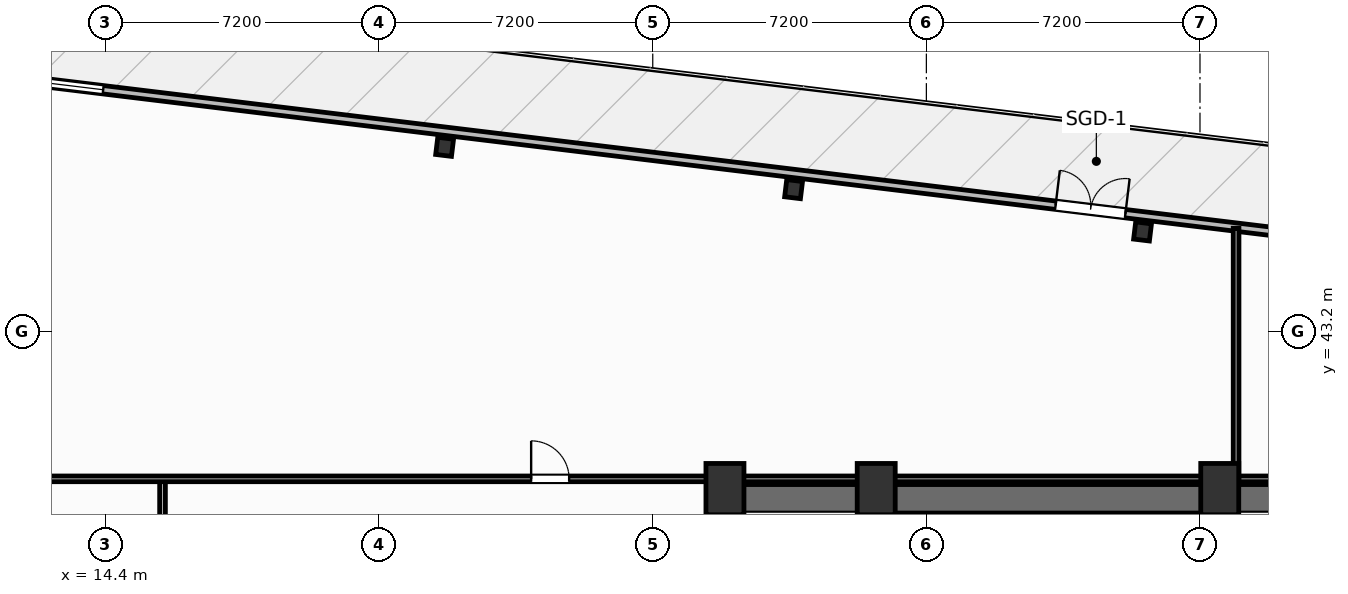
"""IFC4 building model, lengths in metres.
Left out: names, types, materials, properties, quantities, classifications, styles, units other than length and angle.
Written with IfcOpenShell. Run it as: python <this file> out.ifc"""

import sys

from ifc_helpers import new_model, si_unit, direction, frame, frame_2d, origin, origin_2d, place, context, subcontext, project, spatial, rectangle, i_section, extrude, element, fill, save


model = new_model("IFC4")
c1 = context("Model", 3, precision=1e-05, world=origin(), true_north=direction((0.0, 1.0)))
c2 = subcontext(c1, "Body", "Model", "MODEL_VIEW")
j1 = project(units=[si_unit("LENGTHUNIT", "METRE"), si_unit("PLANEANGLEUNIT", "RADIAN")], contexts=[c1])
p1 = place(None, origin())
s1 = spatial("IfcSite", under=j1, at=p1, CompositionType="ELEMENT")
p2 = place(p1, origin())
s2 = spatial("IfcBuilding", under=s1, at=p2, CompositionType="ELEMENT")
p3 = place(p2, frame((0.0, 0.0, 116.9)))
s3 = spatial("IfcBuildingStorey", under=s2, at=p3, CompositionType="ELEMENT", Elevation=116.9)
for number, where, z_axis, x_axis in (
    (1, (30.7, 39.05, 0.0), (0.0, 0.0, 1.0), (1.0, 0.0, 0.0)),
    (2, (34.68, 39.05, 0.0), (0.0, 0.0, 1.0), (1.0, 0.0, 0.0)),
    (3, (43.72, 39.05, 0.0), (0.0, 0.0, 1.0), (1.0, 0.0, 0.0)),
):
    element("IfcColumn", number, at=place(p3, frame(where, z_axis=z_axis, x_axis=x_axis)), inside=s3, PredefinedType="COLUMN", context=c2, shape_type="SweptSolid", body=[
        extrude(rectangle(XDim=1.0, YDim=1.35, at=origin_2d()), origin(), (0.0, 0.0, 1.0), 4.8),
    ])
p4 = place(p3, frame((30.38, 38.795, 0.0), z_axis=(0.0, 0.0, 1.0), x_axis=(1.0, 0.0, 0.0)))
e4 = element("IfcWall", 4, at=p4, inside=s3, PredefinedType="SHEAR", context=c2, shape_type="SweptSolid", body=[
    extrude(rectangle(XDim=17.64, YDim=0.75, at=frame_2d((8.82, 0.0))), origin(), (0.0, 0.0, 1.0), 4.55),
])
p5 = place(p3, frame((30.755, 29.2, 0.0), z_axis=(0.0, 0.0, 1.0), x_axis=(0.0, 1.0, 0.0)))
e5 = element("IfcWall", 5, at=p5, inside=s3, PredefinedType="SHEAR", context=c2, shape_type="SweptSolid", body=[
    extrude(rectangle(XDim=9.22, YDim=0.75, at=frame_2d((4.61, 0.0))), origin(), (0.0, 0.0, 1.0), 4.55),
])
p6 = place(p3, frame((34.64, 29.2, 0.0), z_axis=(0.0, 0.0, 1.0), x_axis=(0.0, 1.0, 0.0)))
e6 = element("IfcWall", 6, at=p6, inside=s3, PredefinedType="SHEAR", context=c2, shape_type="SweptSolid", body=[
    extrude(rectangle(XDim=9.22, YDim=0.25, at=frame_2d((4.61, 0.0))), origin(), (0.0, 0.0, 1.0), 4.55),
])
p7 = place(p6, frame((0.65, 0.0, 0.0)))
e7 = element("IfcOpeningElement", 7, at=p7, cuts=e6, PredefinedType="OPENING", context=c2, shape_type="SweptSolid", body=[
    extrude(rectangle(XDim=1.05, YDim=2.15, at=frame_2d((0.525, 1.075))), frame((0.0, 0.135, 0.0), z_axis=(0.0, -1.0, 0.0), x_axis=(1.0, 0.0, 0.0)), (0.0, 0.0, 1.0), 0.27),
])
p8 = place(p3, frame((43.76, 29.2, 0.0), z_axis=(0.0, 0.0, 1.0), x_axis=(0.0, 1.0, 0.0)))
e8 = element("IfcWall", 8, at=p8, inside=s3, PredefinedType="SHEAR", context=c2, shape_type="SweptSolid", body=[
    extrude(rectangle(XDim=9.22, YDim=0.25, at=frame_2d((4.61, 0.0))), origin(), (0.0, 0.0, 1.0), 4.55),
])
p9 = place(p8, frame((0.65, 0.0, 0.0)))
e9 = element("IfcOpeningElement", 9, at=p9, cuts=e8, PredefinedType="OPENING", context=c2, shape_type="SweptSolid", body=[
    extrude(rectangle(XDim=1.05, YDim=2.15, at=frame_2d((0.525, 1.075))), frame((0.0, 0.135, 0.0), z_axis=(0.0, -1.0, 0.0), x_axis=(1.0, 0.0, 0.0)), (0.0, 0.0, 1.0), 0.27),
])
for number, where, z_axis, x_axis in (
    (10, (41.689, 45.83, -0.32), (0.0, 0.0, 1.0), (0.993, -0.12, 0.0)),
    (11, (32.506, 46.943, -0.32), (0.0, 0.0, 1.0), (0.993, -0.12, 0.0)),
    (12, (23.323, 48.056, -0.32), (0.0, 0.0, 1.0), (0.993, -0.12, 0.0)),
):
    element("IfcColumn", number, at=place(p3, frame(where, z_axis=z_axis, x_axis=x_axis)), inside=s3, PredefinedType="COLUMN", context=c2, shape_type="SweptSolid", body=[
        extrude(i_section(OverallWidth=0.418, OverallDepth=0.455, WebThickness=0.042, FlangeThickness=0.068, FilletRadius=0.025, at=origin_2d()), origin(), (0.0, 0.0, 1.0), 5.12),
    ])
p10 = place(p3, frame((12.155, 49.823, 0.0), z_axis=(0.0, 0.0, 1.0), x_axis=(0.992732017356, -0.120345925214, 0.0)))
e13 = element("IfcWall", 13, at=p10, inside=s3, PredefinedType="SOLIDWALL", context=c2, shape_type="SweptSolid", body=[
    extrude(rectangle(XDim=59.6, YDim=0.22, at=frame_2d((29.8, 0.0))), origin(), (0.0, 0.0, 1.0), 3.83),
])
p11 = place(p10, frame((27.446, 0.0, 0.0)))
e14 = element("IfcOpeningElement", 14, at=p11, cuts=e13, PredefinedType="OPENING", context=c2, shape_type="SweptSolid", body=[
    extrude(rectangle(XDim=1.85, YDim=2.3, at=frame_2d((0.925, 1.15))), frame((0.0, 0.12, 0.0), z_axis=(0.0, -1.0, 0.0), x_axis=(1.0, 0.0, 0.0)), (0.0, 0.0, 1.0), 0.24),
])
p12 = place(p10, frame((0.55, 0.0, 0.75)))
e15 = element("IfcOpeningElement", 15, at=p12, cuts=e13, PredefinedType="OPENING", context=c2, shape_type="SweptSolid", body=[
    extrude(rectangle(XDim=1.65, YDim=1.65, at=frame_2d((0.825, 0.825))), frame((0.0, 0.12, 0.0), z_axis=(0.0, -1.0, 0.0), x_axis=(1.0, 0.0, 0.0)), (0.0, 0.0, 1.0), 0.24),
])
p13 = place(p10, frame((57.4, 0.0, 0.75)))
e16 = element("IfcOpeningElement", 16, at=p13, cuts=e13, PredefinedType="OPENING", context=c2, shape_type="SweptSolid", body=[
    extrude(rectangle(XDim=1.65, YDim=1.65, at=frame_2d((0.825, 0.825))), frame((0.0, 0.12, 0.0), z_axis=(0.0, -1.0, 0.0), x_axis=(1.0, 0.0, 0.0)), (0.0, 0.0, 1.0), 0.24),
])
p14 = place(p3, frame((15.9, 6.91, 0.0), z_axis=(0.0, 0.0, 1.0), x_axis=(0.0, 1.0, 0.0)))
e17 = element("IfcWall", 17, at=p14, inside=s3, PredefinedType="PARTITIONING", context=c2, shape_type="SweptSolid", body=[
    extrude(rectangle(XDim=32.41, YDim=0.15, at=frame_2d((16.205, 0.0))), origin(), (0.0, 0.0, 1.0), 4.55),
])
p15 = place(p14, frame((20.54, 0.0, 0.0)))
e18 = element("IfcOpeningElement", 18, at=p15, cuts=e17, PredefinedType="OPENING", context=c2, shape_type="SweptSolid", body=[
    extrude(rectangle(XDim=1.0, YDim=2.05, at=frame_2d((0.5, 1.025))), frame((0.0, 0.085, 0.0), z_axis=(0.0, -1.0, 0.0), x_axis=(1.0, 0.0, 0.0)), (0.0, 0.0, 1.0), 0.17),
])
p16 = place(p3, frame((10.0, 39.32, 0.0), z_axis=(0.0, 0.0, 1.0), x_axis=(1.0, 0.0, 0.0)))
e19 = element("IfcWall", 19, at=p16, inside=s3, PredefinedType="PARTITIONING", context=c2, shape_type="SweptSolid", body=[
    extrude(rectangle(XDim=62.0, YDim=0.15, at=frame_2d((31.0, 0.0))), origin(), (0.0, 0.0, 1.0), 4.55),
])
p17 = place(p16, frame((15.6, 0.0, 0.0)))
e20 = element("IfcOpeningElement", 20, at=p17, cuts=e19, PredefinedType="OPENING", context=c2, shape_type="SweptSolid", body=[
    extrude(rectangle(XDim=1.0, YDim=2.05, at=frame_2d((0.5, 1.025))), frame((0.0, 0.085, 0.0), z_axis=(0.0, -1.0, 0.0), x_axis=(1.0, 0.0, 0.0)), (0.0, 0.0, 1.0), 0.17),
])
p18 = place(p16, frame((39.5, 0.0, 0.0)))
e21 = element("IfcOpeningElement", 21, at=p18, cuts=e19, PredefinedType="OPENING", context=c2, shape_type="SweptSolid", body=[
    extrude(rectangle(XDim=2.0, YDim=2.05, at=frame_2d((1.0, 1.025))), frame((0.0, 0.085, 0.0), z_axis=(0.0, -1.0, 0.0), x_axis=(1.0, 0.0, 0.0)), (0.0, 0.0, 1.0), 0.17),
])
p19 = place(p3, frame((44.15, 39.32, 0.0), z_axis=(0.0, 0.0, 1.0), x_axis=(0.0, 1.0, 0.0)))
e22 = element("IfcWall", 22, at=p19, inside=s3, PredefinedType="PARTITIONING", context=c2, shape_type="SweptSolid", body=[
    extrude(rectangle(XDim=6.594, YDim=0.15, at=frame_2d((3.297, 0.0))), origin(), (0.0, 0.0, 1.0), 4.55),
])
p20 = place(p11, origin())
e23 = element("IfcDoor", 23, at=p20, inside=s3, OperationType="DOUBLE_DOOR_SINGLE_SWING", PredefinedType="DOOR", context=c2, shape_type="SweptSolid", body=[
    extrude(rectangle(XDim=1.85, YDim=2.3, at=frame_2d((0.925, 1.15))), frame((0.0, 0.025, 0.0), z_axis=(0.0, -1.0, 0.0), x_axis=(1.0, 0.0, 0.0)), (0.0, 0.0, 1.0), 0.05),
])
fill(e14, e23)
p21 = place(p12, origin())
e24 = element("IfcWindow", 24, at=p21, inside=s3, PartitioningType="SINGLE_PANEL", PredefinedType="WINDOW", context=c2, shape_type="SweptSolid", body=[
    extrude(rectangle(XDim=1.65, YDim=1.65, at=frame_2d((0.825, 0.825))), frame((0.0, 0.03, 0.0), z_axis=(0.0, -1.0, 0.0), x_axis=(1.0, 0.0, 0.0)), (0.0, 0.0, 1.0), 0.06),
])
fill(e15, e24)
p22 = place(p17, origin())
e25 = element("IfcDoor", 25, at=p22, inside=s3, OperationType="SINGLE_SWING_LEFT", PredefinedType="DOOR", context=c2, shape_type="SweptSolid", body=[
    extrude(rectangle(XDim=1.0, YDim=2.05, at=frame_2d((0.5, 1.025))), frame((0.0, 0.025, 0.0), z_axis=(0.0, -1.0, 0.0), x_axis=(1.0, 0.0, 0.0)), (0.0, 0.0, 1.0), 0.05),
])
fill(e20, e25)
save(model, sys.argv[1])
